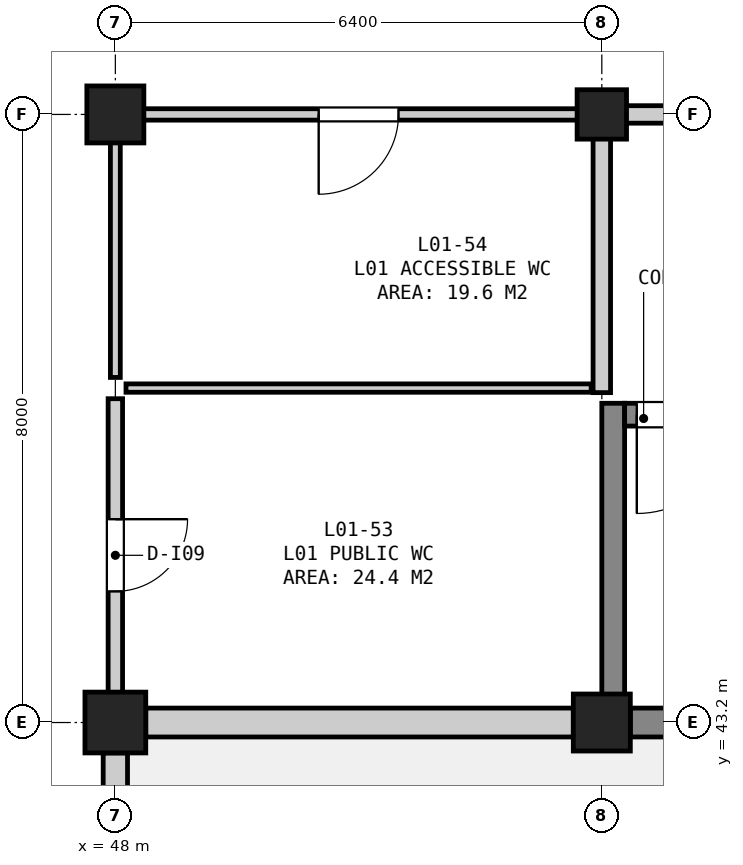
"""IFC4 building model, lengths in metres.
Left out: names, types, materials, properties, quantities, classifications, styles, units other than length and angle.
Written with IfcOpenShell. Run it as: python <this file> out.ifc"""

import sys

from ifc_helpers import new_model, si_unit, direction, frame, frame_2d, origin, origin_2d, place, context, subcontext, project, spatial, rectangle, extrude, element, fill, save


model = new_model("IFC4")
c1 = context("Model", 3, precision=1e-05, world=origin(), true_north=direction((0.0, 1.0)))
c2 = subcontext(c1, "Body", "Model", "MODEL_VIEW")
j1 = project(units=[si_unit("LENGTHUNIT", "METRE"), si_unit("PLANEANGLEUNIT", "RADIAN")], contexts=[c1])
p1 = place(None, origin())
s1 = spatial("IfcSite", under=j1, at=p1, CompositionType="ELEMENT")
p2 = place(p1, origin())
s2 = spatial("IfcBuilding", under=s1, at=p2, CompositionType="ELEMENT")
p3 = place(p2, frame((0.0, 0.0, 5.4)))
s3 = spatial("IfcBuildingStorey", under=s2, at=p3, CompositionType="ELEMENT", Elevation=5.4)
p4 = place(p3, frame((48.0, 43.2, 0.0), z_axis=(0.0, 0.0, 1.0), x_axis=(1.0, 0.0, 0.0)))
e1 = element("IfcColumn", 1, at=p4, inside=s3, PredefinedType="COLUMN", context=c2, shape_type="SweptSolid", body=[
    extrude(rectangle(XDim=0.8, YDim=0.8, at=origin_2d()), origin(), (0.0, 0.0, 1.0), 5.4),
])
for number, where, z_axis, x_axis in (
    (2, (48.0, 51.2, 0.0), (0.0, 0.0, 1.0), (1.0, 0.0, 0.0)),
    (3, (54.4, 43.2, 0.0), (0.0, 0.0, 1.0), (1.0, 0.0, 0.0)),
):
    element("IfcColumn", number, at=place(p3, frame(where, z_axis=z_axis, x_axis=x_axis)), inside=s3, PredefinedType="COLUMN", context=c2, shape_type="SweptSolid", body=[
        extrude(rectangle(XDim=0.75, YDim=0.75, at=origin_2d()), origin(), (0.0, 0.0, 1.0), 5.4),
    ])
p5 = place(p3, frame((54.4, 51.2, 0.0), z_axis=(0.0, 0.0, 1.0), x_axis=(1.0, 0.0, 0.0)))
e4 = element("IfcColumn", 4, at=p5, inside=s3, PredefinedType="COLUMN", context=c2, shape_type="SweptSolid", body=[
    extrude(rectangle(XDim=0.65, YDim=0.65, at=origin_2d()), origin(), (0.0, 0.0, 1.0), 5.4),
])
p6 = place(p3, frame((48.0, 36.425, 0.0), z_axis=(0.0, 0.0, 1.0), x_axis=(0.0, 1.0, 0.0)))
e5 = element("IfcWall", 5, at=p6, inside=s3, PredefinedType="SOLIDWALL", context=c2, shape_type="SweptSolid", body=[
    extrude(rectangle(XDim=6.375, YDim=0.32, at=frame_2d((3.188, 0.0))), origin(), (0.0, 0.0, 1.0), 4.44),
])
p7 = place(p6, frame((1.788, 0.0, 0.9)))
e6 = element("IfcOpeningElement", 6, at=p7, cuts=e5, PredefinedType="OPENING", context=c2, shape_type="SweptSolid", body=[
    extrude(rectangle(XDim=1.1, YDim=1.55, at=frame_2d((0.55, 0.775))), frame((0.0, 0.172, 0.0), z_axis=(0.0, -1.0, 0.0), x_axis=(1.0, 0.0, 0.0)), (0.0, 0.0, 1.0), 0.344),
])
p8 = place(p3, frame((48.4, 43.2, 0.0), z_axis=(0.0, 0.0, 1.0), x_axis=(1.0, 0.0, 0.0)))
e7 = element("IfcWall", 7, at=p8, inside=s3, PredefinedType="SOLIDWALL", context=c2, shape_type="SweptSolid", body=[
    extrude(rectangle(XDim=5.625, YDim=0.38, at=frame_2d((2.812, 0.0))), origin(), (0.0, 0.0, 1.0), 4.44),
])
p9 = place(p3, frame((54.775, 43.2, 0.0), z_axis=(0.0, 0.0, 1.0), x_axis=(1.0, 0.0, 0.0)))
e8 = element("IfcWall", 8, at=p9, inside=s3, PredefinedType="SOLIDWALL", context=c2, shape_type="SweptSolid", body=[
    extrude(rectangle(XDim=7.3, YDim=0.38, at=frame_2d((3.65, 0.0))), origin(), (0.0, 0.0, 1.0), 4.455),
])
p10 = place(p9, frame((2.75, 0.0, 0.9)))
e9 = element("IfcOpeningElement", 9, at=p10, cuts=e8, PredefinedType="OPENING", context=c2, shape_type="SweptSolid", body=[
    extrude(rectangle(XDim=1.8, YDim=2.1, at=frame_2d((0.9, 1.05))), frame((0.0, 0.202, 0.0), z_axis=(0.0, -1.0, 0.0), x_axis=(1.0, 0.0, 0.0)), (0.0, 0.0, 1.0), 0.404),
])
p11 = place(p3, frame((54.55, 43.2, 0.0), z_axis=(0.0, 0.0, 1.0), x_axis=(0.0, 1.0, 0.0)))
e10 = element("IfcWall", 10, at=p11, inside=s3, PredefinedType="SHEAR", context=c2, shape_type="SweptSolid", body=[
    extrude(rectangle(XDim=4.2, YDim=0.3, at=frame_2d((2.1, 0.0))), origin(), (0.0, 0.0, 1.0), 5.1),
])
p12 = place(p3, frame((54.7, 47.25, 0.0), z_axis=(0.0, 0.0, 1.0), x_axis=(1.0, 0.0, 0.0)))
e11 = element("IfcWall", 11, at=p12, inside=s3, PredefinedType="SHEAR", context=c2, shape_type="SweptSolid", body=[
    extrude(rectangle(XDim=7.4, YDim=0.3, at=frame_2d((3.7, 0.0))), origin(), (0.0, 0.0, 1.0), 5.1),
])
p13 = place(p12, frame((0.16, 0.0, 0.0)))
e12 = element("IfcOpeningElement", 12, at=p13, cuts=e11, PredefinedType="OPENING", context=c2, shape_type="SweptSolid", body=[
    extrude(rectangle(XDim=1.3, YDim=2.18, at=frame_2d((0.65, 1.09))), frame((0.0, 0.162, 0.0), z_axis=(0.0, -1.0, 0.0), x_axis=(1.0, 0.0, 0.0)), (0.0, 0.0, 1.0), 0.324),
])
p14 = place(p3, frame((54.54, 51.2, 0.0), z_axis=(0.0, 0.0, 1.0), x_axis=(1.0, 0.0, 0.0)))
e13 = element("IfcWall", 13, at=p14, inside=s3, PredefinedType="SOLIDWALL", context=c2, shape_type="SweptSolid", body=[
    extrude(rectangle(XDim=7.72, YDim=0.23, at=frame_2d((3.86, 0.0))), origin(), (0.0, 0.0, 1.0), 4.485),
])
p15 = place(p14, frame((3.56, 0.0, 0.0)))
e14 = element("IfcOpeningElement", 14, at=p15, cuts=e13, PredefinedType="OPENING", context=c2, shape_type="SweptSolid", body=[
    extrude(rectangle(XDim=1.4, YDim=2.2, at=frame_2d((0.7, 1.1))), frame((0.0, 0.127, 0.0), z_axis=(0.0, -1.0, 0.0), x_axis=(1.0, 0.0, 0.0)), (0.0, 0.0, 1.0), 0.254),
])
p16 = place(p3, frame((54.4, 47.54, 0.0), z_axis=(0.0, 0.0, 1.0), x_axis=(0.0, 1.0, 0.0)))
e15 = element("IfcWall", 15, at=p16, inside=s3, PredefinedType="SOLIDWALL", context=c2, shape_type="SweptSolid", body=[
    extrude(rectangle(XDim=3.52, YDim=0.23, at=frame_2d((1.76, 0.0))), origin(), (0.0, 0.0, 1.0), 4.185),
])
p17 = place(p3, frame((48.14, 47.6, 0.0), z_axis=(0.0, 0.0, 1.0), x_axis=(1.0, 0.0, 0.0)))
e16 = element("IfcWall", 16, at=p17, inside=s3, PredefinedType="PARTITIONING", context=c2, shape_type="SweptSolid", body=[
    extrude(rectangle(XDim=6.12, YDim=0.11, at=frame_2d((3.06, 0.0))), origin(), (0.0, 0.0, 1.0), 5.1),
])
p18 = place(p3, frame((48.0, 43.305, 0.0), z_axis=(0.0, 0.0, 1.0), x_axis=(0.0, 1.0, 0.0)))
e17 = element("IfcWall", 17, at=p18, inside=s3, PredefinedType="PARTITIONING", context=c2, shape_type="SweptSolid", body=[
    extrude(rectangle(XDim=4.155, YDim=0.19, at=frame_2d((2.078, 0.0))), origin(), (0.0, 0.0, 1.0), 4.385),
])
p19 = place(p18, frame((1.62, 0.0, 0.0)))
e18 = element("IfcOpeningElement", 18, at=p19, cuts=e17, PredefinedType="OPENING", context=c2, shape_type="SweptSolid", body=[
    extrude(rectangle(XDim=0.95, YDim=2.15, at=frame_2d((0.475, 1.075))), frame((0.0, 0.107, 0.0), z_axis=(0.0, -1.0, 0.0), x_axis=(1.0, 0.0, 0.0)), (0.0, 0.0, 1.0), 0.214),
])
p20 = place(p3, frame((48.14, 51.2, 0.0), z_axis=(0.0, 0.0, 1.0), x_axis=(1.0, 0.0, 0.0)))
e19 = element("IfcWall", 19, at=p20, inside=s3, PredefinedType="PARTITIONING", context=c2, shape_type="SweptSolid", body=[
    extrude(rectangle(XDim=6.12, YDim=0.15, at=frame_2d((3.06, 0.0))), origin(), (0.0, 0.0, 1.0), 4.435),
])
p21 = place(p20, frame((2.535, 0.0, 0.0)))
e20 = element("IfcOpeningElement", 20, at=p21, cuts=e19, PredefinedType="OPENING", context=c2, shape_type="SweptSolid", body=[
    extrude(rectangle(XDim=1.05, YDim=2.15, at=frame_2d((0.525, 1.075))), frame((0.0, 0.087, 0.0), z_axis=(0.0, -1.0, 0.0), x_axis=(1.0, 0.0, 0.0)), (0.0, 0.0, 1.0), 0.174),
])
p22 = place(p3, frame((48.0, 47.74, 0.0), z_axis=(0.0, 0.0, 1.0), x_axis=(0.0, 1.0, 0.0)))
e21 = element("IfcWall", 21, at=p22, inside=s3, PredefinedType="PARTITIONING", context=c2, shape_type="SweptSolid", body=[
    extrude(rectangle(XDim=3.32, YDim=0.13, at=frame_2d((1.66, 0.0))), origin(), (0.0, 0.0, 1.0), 4.385),
])
p23 = place(p13, frame((1.3, 0.0, 0.0), z_axis=(0.0, 0.0, 1.0), x_axis=(-1.0, 0.0, 0.0)))
e22 = element("IfcDoor", 22, at=p23, inside=s3, OperationType="SINGLE_SWING_RIGHT", PredefinedType="DOOR", context=c2, shape_type="SweptSolid", body=[
    extrude(rectangle(XDim=1.3, YDim=2.18, at=frame_2d((0.65, 1.09))), frame((0.0, 0.025, 0.0), z_axis=(0.0, -1.0, 0.0), x_axis=(1.0, 0.0, 0.0)), (0.0, 0.0, 1.0), 0.05),
])
fill(e12, e22)
p24 = place(p19, frame((0.95, 0.0, 0.0), z_axis=(0.0, 0.0, 1.0), x_axis=(-1.0, 0.0, 0.0)))
e23 = element("IfcDoor", 23, at=p24, inside=s3, OperationType="SINGLE_SWING_LEFT", PredefinedType="DOOR", context=c2, shape_type="SweptSolid", body=[
    extrude(rectangle(XDim=0.95, YDim=2.15, at=frame_2d((0.475, 1.075))), frame((0.0, 0.025, 0.0), z_axis=(0.0, -1.0, 0.0), x_axis=(1.0, 0.0, 0.0)), (0.0, 0.0, 1.0), 0.05),
])
fill(e18, e23)
p25 = place(p21, frame((1.05, 0.0, 0.0), z_axis=(0.0, 0.0, 1.0), x_axis=(-1.0, 0.0, 0.0)))
e24 = element("IfcDoor", 24, at=p25, inside=s3, OperationType="SINGLE_SWING_RIGHT", PredefinedType="DOOR", context=c2, shape_type="SweptSolid", body=[
    extrude(rectangle(XDim=1.05, YDim=2.15, at=frame_2d((0.525, 1.075))), frame((0.0, 0.025, 0.0), z_axis=(0.0, -1.0, 0.0), x_axis=(1.0, 0.0, 0.0)), (0.0, 0.0, 1.0), 0.05),
])
fill(e20, e24)
save(model, sys.argv[1])
